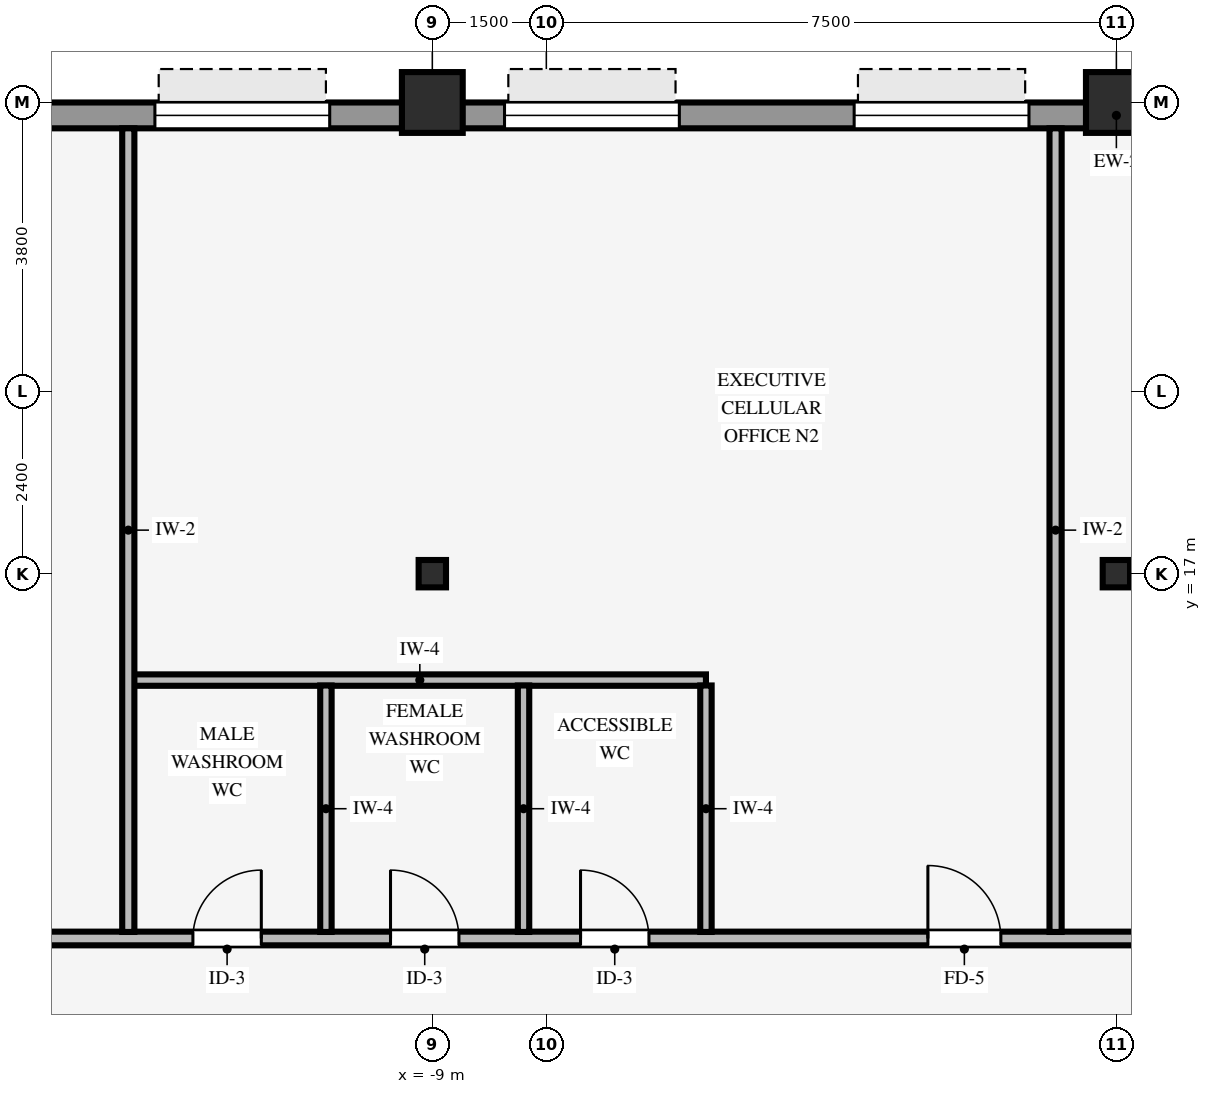
"""IFC4 building model, lengths in metres.
Left out: names, types, materials, properties, quantities, classifications, styles, units other than length and angle.
Written with IfcOpenShell. Run it as: python <this file> out.ifc"""

import sys

from ifc_helpers import new_model, si_unit, direction, frame, frame_2d, origin, origin_2d, place, context, subcontext, project, spatial, rectangle, hollow_rectangle, i_section, extrude, source, transform, mapped, element, fill, save


model = new_model("IFC4")
c1 = context("Model", 3, precision=1e-05, world=origin(), true_north=direction((0.0, 1.0)))
c2 = subcontext(c1, "Body", "Model", "MODEL_VIEW")
j1 = project(units=[si_unit("LENGTHUNIT", "METRE"), si_unit("PLANEANGLEUNIT", "RADIAN")], contexts=[c1])
p1 = place(None, origin())
s1 = spatial("IfcSite", under=j1, at=p1, CompositionType="ELEMENT")
p2 = place(p1, origin())
s2 = spatial("IfcBuilding", under=s1, at=p2, CompositionType="ELEMENT")
p3 = place(p2, frame((0.0, 0.0, 71.4)))
s3 = spatial("IfcBuildingStorey", under=s2, at=p3, CompositionType="ELEMENT", Elevation=71.4)
for number, where, z_axis, x_axis in (
    (1, (-9.0, 23.2, 0.0), (0.0, 0.0, 1.0), (1.0, 0.0, 0.0)),
    (2, (0.0, 23.2, 0.0), (0.0, 0.0, 1.0), (1.0, 0.0, 0.0)),
):
    element("IfcColumn", number, at=place(p3, frame(where, z_axis=z_axis, x_axis=x_axis)), inside=s3, PredefinedType="COLUMN", context=c2, shape_type="SweptSolid", body=[
        extrude(hollow_rectangle(XDim=0.8, YDim=0.8, WallThickness=0.055, InnerFilletRadius=0.055, OuterFilletRadius=0.11, at=origin_2d()), origin(), (0.0, 0.0, 1.0), 3.37),
    ])
for number, where, z_axis, x_axis in (
    (3, (0.0, 17.0, 0.0), (0.0, 0.0, 1.0), (1.0, 0.0, 0.0)),
    (4, (-9.0, 17.0, 0.0), (0.0, 0.0, 1.0), (1.0, 0.0, 0.0)),
):
    element("IfcColumn", number, at=place(p3, frame(where, z_axis=z_axis, x_axis=x_axis)), inside=s3, PredefinedType="COLUMN", context=c2, shape_type="SweptSolid", body=[
        extrude(i_section(OverallWidth=0.36, OverallDepth=0.36, WebThickness=0.021, FlangeThickness=0.021, FilletRadius=0.018, at=origin_2d()), origin(), (0.0, 0.0, 1.0), 3.37),
    ])
p4 = place(p3, frame((-19.4, 23.03, 0.0), z_axis=(0.0, 0.0, 1.0), x_axis=(1.0, 0.0, 0.0)))
e5 = element("IfcWall", 5, at=p4, inside=s3, PredefinedType="STANDARD", context=c2, shape_type="SweptSolid", body=[
    extrude(rectangle(XDim=38.8, YDim=0.34, at=frame_2d((19.4, 0.0))), origin(), (0.0, 0.0, 1.0), 2.705),
])
p5 = place(p4, frame((2.15, 0.0, 0.8)))
e6 = element("IfcOpeningElement", 6, at=p5, cuts=e5, PredefinedType="OPENING", context=c2, shape_type="SweptSolid", body=[
    extrude(rectangle(XDim=2.3, YDim=1.62, at=frame_2d((1.15, 0.81))), frame((0.0, 0.18, 0.0), z_axis=(0.0, -1.0, 0.0), x_axis=(1.0, 0.0, 0.0)), (0.0, 0.0, 1.0), 0.36),
])
p6 = place(p4, frame((6.75, 0.0, 0.8)))
e7 = element("IfcOpeningElement", 7, at=p6, cuts=e5, PredefinedType="OPENING", context=c2, shape_type="SweptSolid", body=[
    extrude(rectangle(XDim=2.3, YDim=1.62, at=frame_2d((1.15, 0.81))), frame((0.0, 0.18, 0.0), z_axis=(0.0, -1.0, 0.0), x_axis=(1.0, 0.0, 0.0)), (0.0, 0.0, 1.0), 0.36),
])
p7 = place(p4, frame((11.35, 0.0, 0.8)))
e8 = element("IfcOpeningElement", 8, at=p7, cuts=e5, PredefinedType="OPENING", context=c2, shape_type="SweptSolid", body=[
    extrude(rectangle(XDim=2.3, YDim=1.62, at=frame_2d((1.15, 0.81))), frame((0.0, 0.18, 0.0), z_axis=(0.0, -1.0, 0.0), x_axis=(1.0, 0.0, 0.0)), (0.0, 0.0, 1.0), 0.36),
])
p8 = place(p4, frame((15.95, 0.0, 0.8)))
e9 = element("IfcOpeningElement", 9, at=p8, cuts=e5, PredefinedType="OPENING", context=c2, shape_type="SweptSolid", body=[
    extrude(rectangle(XDim=2.3, YDim=1.62, at=frame_2d((1.15, 0.81))), frame((0.0, 0.18, 0.0), z_axis=(0.0, -1.0, 0.0), x_axis=(1.0, 0.0, 0.0)), (0.0, 0.0, 1.0), 0.36),
])
p9 = place(p4, frame((20.55, 0.0, 0.8)))
e10 = element("IfcOpeningElement", 10, at=p9, cuts=e5, PredefinedType="OPENING", context=c2, shape_type="SweptSolid", body=[
    extrude(rectangle(XDim=2.3, YDim=1.62, at=frame_2d((1.15, 0.81))), frame((0.0, 0.18, 0.0), z_axis=(0.0, -1.0, 0.0), x_axis=(1.0, 0.0, 0.0)), (0.0, 0.0, 1.0), 0.36),
])
p10 = place(p4, frame((25.15, 0.0, 0.8)))
e11 = element("IfcOpeningElement", 11, at=p10, cuts=e5, PredefinedType="OPENING", context=c2, shape_type="SweptSolid", body=[
    extrude(rectangle(XDim=2.3, YDim=1.62, at=frame_2d((1.15, 0.81))), frame((0.0, 0.18, 0.0), z_axis=(0.0, -1.0, 0.0), x_axis=(1.0, 0.0, 0.0)), (0.0, 0.0, 1.0), 0.36),
])
p11 = place(p4, frame((31.1, 0.0, 0.8)))
e12 = element("IfcOpeningElement", 12, at=p11, cuts=e5, PredefinedType="OPENING", context=c2, shape_type="SweptSolid", body=[
    extrude(rectangle(XDim=2.3, YDim=1.62, at=frame_2d((1.15, 0.81))), frame((0.0, 0.18, 0.0), z_axis=(0.0, -1.0, 0.0), x_axis=(1.0, 0.0, 0.0)), (0.0, 0.0, 1.0), 0.36),
])
p12 = place(p4, frame((34.35, 0.0, 0.8)))
e13 = element("IfcOpeningElement", 13, at=p12, cuts=e5, PredefinedType="OPENING", context=c2, shape_type="SweptSolid", body=[
    extrude(rectangle(XDim=2.3, YDim=1.62, at=frame_2d((1.15, 0.81))), frame((0.0, 0.18, 0.0), z_axis=(0.0, -1.0, 0.0), x_axis=(1.0, 0.0, 0.0)), (0.0, 0.0, 1.0), 0.36),
])
p13 = place(p3, frame((-15.0, 12.2, 0.0), z_axis=(0.0, 0.0, 1.0), x_axis=(1.0, 0.0, 0.0)))
e14 = element("IfcWall", 14, at=p13, inside=s3, PredefinedType="PARTITIONING", context=c2, shape_type="SweptSolid", body=[
    extrude(rectangle(XDim=30.0, YDim=0.18, at=frame_2d((15.0, 0.0))), origin(), (0.0, 0.0, 1.0), 3.36),
])
p14 = place(p13, frame((22.085, 0.0, 0.0)))
e15 = element("IfcOpeningElement", 15, at=p14, cuts=e14, PredefinedType="OPENING", context=c2, shape_type="SweptSolid", body=[
    extrude(rectangle(XDim=0.96, YDim=2.1, at=frame_2d((0.48, 1.05))), frame((0.0, 0.1, 0.0), z_axis=(0.0, -1.0, 0.0), x_axis=(1.0, 0.0, 0.0)), (0.0, 0.0, 1.0), 0.2),
])
p15 = place(p13, frame((16.175, 0.0, 0.0)))
e16 = element("IfcOpeningElement", 16, at=p15, cuts=e14, PredefinedType="OPENING", context=c2, shape_type="SweptSolid", body=[
    extrude(rectangle(XDim=0.96, YDim=2.1, at=frame_2d((0.48, 1.05))), frame((0.0, 0.1, 0.0), z_axis=(0.0, -1.0, 0.0), x_axis=(1.0, 0.0, 0.0)), (0.0, 0.0, 1.0), 0.2),
])
p16 = place(p13, frame((5.45, 0.0, 0.0)))
e17 = element("IfcOpeningElement", 17, at=p16, cuts=e14, PredefinedType="OPENING", context=c2, shape_type="SweptSolid", body=[
    extrude(rectangle(XDim=0.9, YDim=2.1, at=frame_2d((0.45, 1.05))), frame((0.0, 0.1, 0.0), z_axis=(0.0, -1.0, 0.0), x_axis=(1.0, 0.0, 0.0)), (0.0, 0.0, 1.0), 0.2),
])
p17 = place(p13, frame((2.85, 0.0, 0.0)))
e18 = element("IfcOpeningElement", 18, at=p17, cuts=e14, PredefinedType="OPENING", context=c2, shape_type="SweptSolid", body=[
    extrude(rectangle(XDim=0.9, YDim=2.1, at=frame_2d((0.45, 1.05))), frame((0.0, 0.1, 0.0), z_axis=(0.0, -1.0, 0.0), x_axis=(1.0, 0.0, 0.0)), (0.0, 0.0, 1.0), 0.2),
])
p18 = place(p13, frame((12.52, 0.0, 0.0)))
e19 = element("IfcOpeningElement", 19, at=p18, cuts=e14, PredefinedType="OPENING", context=c2, shape_type="SweptSolid", body=[
    extrude(rectangle(XDim=0.96, YDim=2.1, at=frame_2d((0.48, 1.05))), frame((0.0, 0.1, 0.0), z_axis=(0.0, -1.0, 0.0), x_axis=(1.0, 0.0, 0.0)), (0.0, 0.0, 1.0), 0.2),
])
p19 = place(p13, frame((7.95, 0.0, 0.0)))
e20 = element("IfcOpeningElement", 20, at=p19, cuts=e14, PredefinedType="OPENING", context=c2, shape_type="SweptSolid", body=[
    extrude(rectangle(XDim=0.9, YDim=2.1, at=frame_2d((0.45, 1.05))), frame((0.0, 0.1, 0.0), z_axis=(0.0, -1.0, 0.0), x_axis=(1.0, 0.0, 0.0)), (0.0, 0.0, 1.0), 0.2),
])
p20 = place(p3, frame((-12.929, 15.6, 0.0), z_axis=(0.0, 0.0, 1.0), x_axis=(1.0, 0.0, 0.0)))
e21 = element("IfcWall", 21, at=p20, inside=s3, PredefinedType="PARTITIONING", context=c2, shape_type="SweptSolid", body=[
    extrude(rectangle(XDim=7.529, YDim=0.15, at=frame_2d((3.765, 0.0))), origin(), (0.0, 0.0, 1.0), 3.36),
])
p21 = place(p3, frame((-13.0, 12.286, 0.0), z_axis=(0.0, 0.0, 1.0), x_axis=(0.0, 1.0, 0.0)))
e22 = element("IfcWall", 22, at=p21, inside=s3, PredefinedType="PARTITIONING", context=c2, shape_type="SweptSolid", body=[
    extrude(rectangle(XDim=10.574, YDim=0.16, at=frame_2d((5.287, 0.0))), origin(), (0.0, 0.0, 1.0), 3.36),
])
for number, where, z_axis, x_axis in (
    (23, (-10.4, 12.286, 0.0), (0.0, 0.0, 1.0), (0.0, 1.0, 0.0)),
    (24, (-7.8, 12.286, 0.0), (0.0, 0.0, 1.0), (0.0, 1.0, 0.0)),
    (25, (-5.4, 12.286, 0.0), (0.0, 0.0, 1.0), (0.0, 1.0, 0.0)),
):
    element("IfcWall", number, at=place(p3, frame(where, z_axis=z_axis, x_axis=x_axis)), inside=s3, PredefinedType="PARTITIONING", context=c2, shape_type="SweptSolid", body=[
        extrude(rectangle(XDim=3.243, YDim=0.15, at=frame_2d((1.622, 0.0))), origin(), (0.0, 0.0, 1.0), 3.36),
    ])
p22 = place(p3, frame((-0.8, 12.286, 0.0), z_axis=(0.0, 0.0, 1.0), x_axis=(0.0, 1.0, 0.0)))
e26 = element("IfcWall", 26, at=p22, inside=s3, PredefinedType="PARTITIONING", context=c2, shape_type="SweptSolid", body=[
    extrude(rectangle(XDim=10.574, YDim=0.16, at=frame_2d((5.287, 0.0))), origin(), (0.0, 0.0, 1.0), 3.36),
])
m1 = source(origin(), c2, "Body", "SweptSolid", [
    extrude(rectangle(XDim=2.3, YDim=1.62, at=frame_2d((1.15, 0.81))), frame((0.0, 0.03, 0.0), z_axis=(0.0, -1.0, 0.0), x_axis=(1.0, 0.0, 0.0)), (0.0, 0.0, 1.0), 0.06),
])
p23 = place(p6, origin())
e27 = element("IfcWindow", 27, at=p23, inside=s3, PartitioningType="SINGLE_PANEL", PredefinedType="WINDOW", context=c2, shape_type="MappedRepresentation", body=[
    mapped(m1, transform((0.0, 0.0, 0.0), scale=1.0)),
])
fill(e7, e27)
p24 = place(p7, origin())
e28 = element("IfcWindow", 28, at=p24, inside=s3, PartitioningType="SINGLE_PANEL", PredefinedType="WINDOW", context=c2, shape_type="MappedRepresentation", body=[
    mapped(m1, transform((0.0, 0.0, 0.0), scale=1.0)),
])
fill(e8, e28)
p25 = place(p8, origin())
e29 = element("IfcWindow", 29, at=p25, inside=s3, PartitioningType="SINGLE_PANEL", PredefinedType="WINDOW", context=c2, shape_type="MappedRepresentation", body=[
    mapped(m1, transform((0.0, 0.0, 0.0), scale=1.0)),
])
fill(e9, e29)
m2 = source(origin(), c2, "Body", "SweptSolid", [
    extrude(rectangle(XDim=0.9, YDim=2.1, at=frame_2d((0.45, 1.05))), frame((0.0, 0.025, 0.0), z_axis=(0.0, -1.0, 0.0), x_axis=(1.0, 0.0, 0.0)), (0.0, 0.0, 1.0), 0.05),
])
p26 = place(p16, origin())
e30 = element("IfcDoor", 30, at=p26, inside=s3, OperationType="SINGLE_SWING_LEFT", PredefinedType="DOOR", context=c2, shape_type="MappedRepresentation", body=[
    mapped(m2, transform((0.0, 0.0, 0.0), scale=1.0)),
])
fill(e17, e30)
p27 = place(p17, origin())
e31 = element("IfcDoor", 31, at=p27, inside=s3, OperationType="SINGLE_SWING_RIGHT", PredefinedType="DOOR", context=c2, shape_type="MappedRepresentation", body=[
    mapped(m2, transform((0.0, 0.0, 0.0), scale=1.0)),
])
fill(e18, e31)
m3 = source(origin(), c2, "Body", "SweptSolid", [
    extrude(rectangle(XDim=0.96, YDim=2.1, at=frame_2d((0.48, 1.05))), frame((0.0, 0.025, 0.0), z_axis=(0.0, -1.0, 0.0), x_axis=(1.0, 0.0, 0.0)), (0.0, 0.0, 1.0), 0.05),
])
p28 = place(p18, origin())
e32 = element("IfcDoor", 32, at=p28, inside=s3, OperationType="SINGLE_SWING_LEFT", PredefinedType="DOOR", context=c2, shape_type="MappedRepresentation", body=[
    mapped(m3, transform((0.0, 0.0, 0.0), scale=1.0)),
])
fill(e19, e32)
p29 = place(p19, origin())
e33 = element("IfcDoor", 33, at=p29, inside=s3, OperationType="SINGLE_SWING_LEFT", PredefinedType="DOOR", context=c2, shape_type="MappedRepresentation", body=[
    mapped(m2, transform((0.0, 0.0, 0.0), scale=1.0)),
])
fill(e20, e33)
save(model, sys.argv[1])
